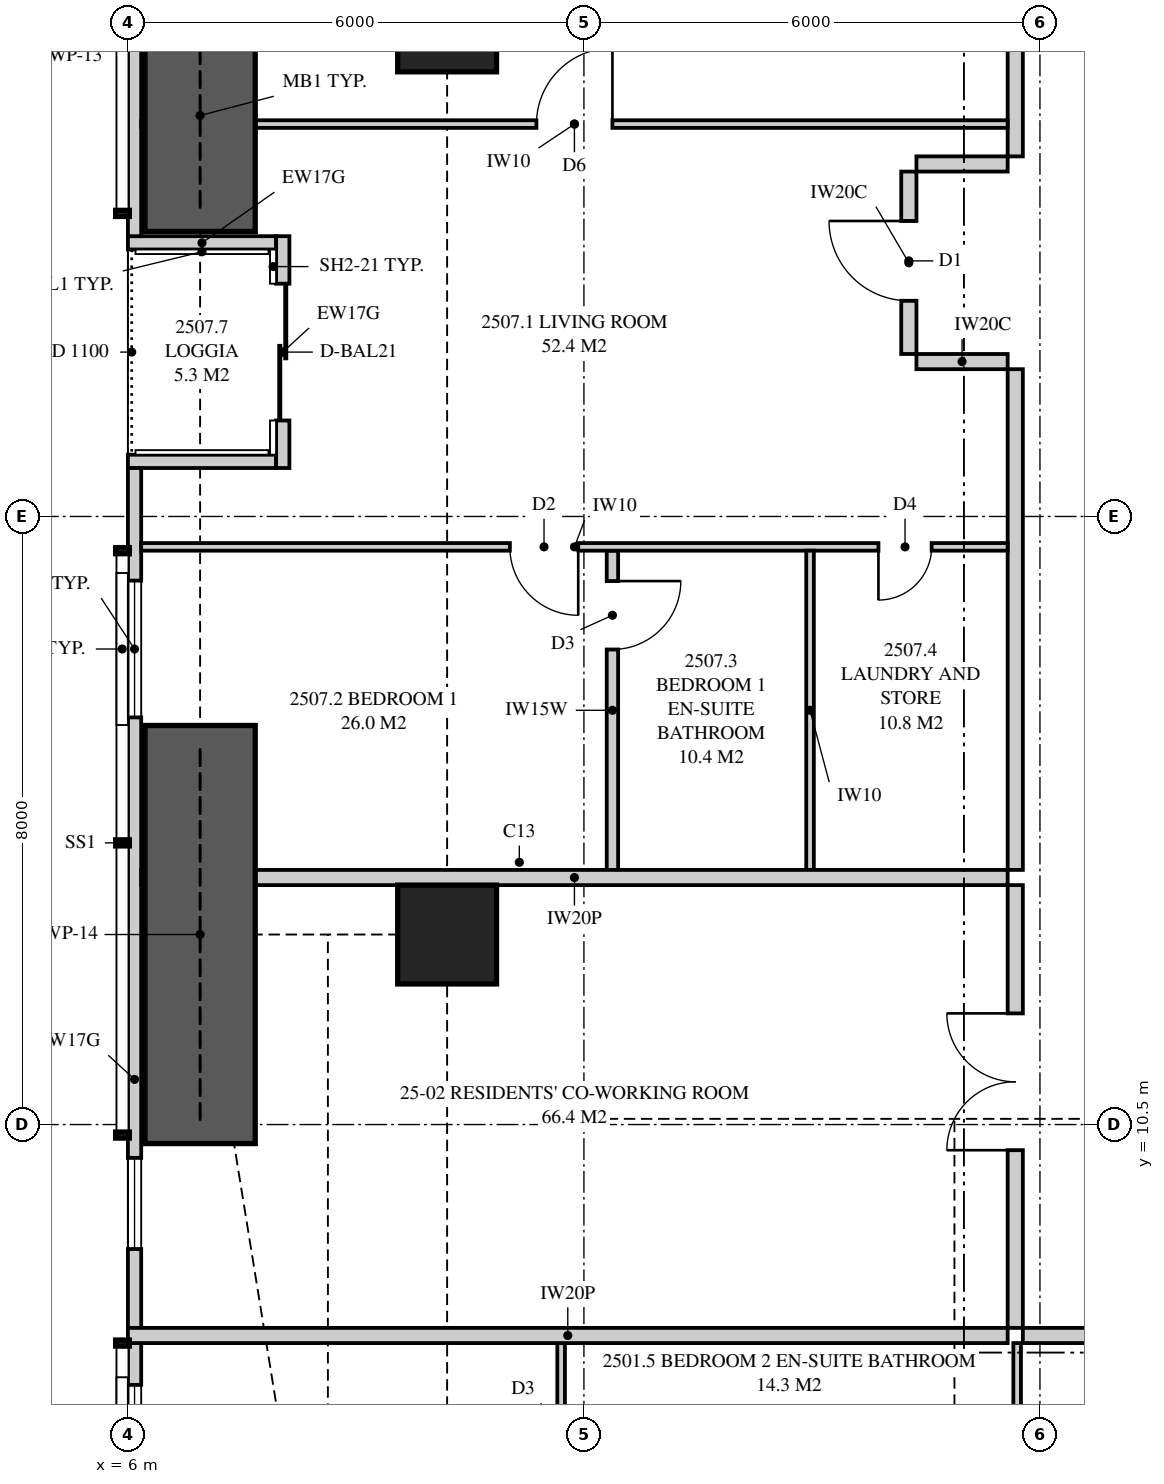
"""IFC4 building model, lengths in metres.
Left out: names, types, materials, properties, quantities, classifications, styles, units other than length and angle.
Written with IfcOpenShell. Run it as: python <this file> out.ifc"""

import sys

from ifc_helpers import new_model, si_unit, direction, frame, frame_2d, origin, origin_2d, place, context, subcontext, project, spatial, polyline, rectangle, outline, extrude, element, fill, save


model = new_model("IFC4")
c1 = context("Model", 3, precision=1e-05, world=origin(), true_north=direction((0.0, 1.0)))
c2 = subcontext(c1, "Body", "Model", "MODEL_VIEW")
j1 = project(units=[si_unit("LENGTHUNIT", "METRE"), si_unit("PLANEANGLEUNIT", "RADIAN")], contexts=[c1])
p1 = place(None, origin())
s1 = spatial("IfcSite", under=j1, at=p1, CompositionType="ELEMENT")
p2 = place(p1, origin())
s2 = spatial("IfcBuilding", under=s1, at=p2, CompositionType="ELEMENT")
p3 = place(p2, frame((0.0, 0.0, 94.8)))
s3 = spatial("IfcBuildingStorey", under=s2, at=p3, CompositionType="ELEMENT", Elevation=94.8)
for number, where, z_axis, x_axis in (
    (1, (10.2, 13.0, 0.0), (0.0, 0.0, 1.0), (1.0, 0.0, 0.0)),
    (2, (10.2, 25.0, 0.0), (0.0, 0.0, 1.0), (1.0, 0.0, 0.0)),
):
    element("IfcColumn", number, at=place(p3, frame(where, z_axis=z_axis, x_axis=x_axis)), inside=s3, PredefinedType="COLUMN", context=c2, shape_type="SweptSolid", body=[
        extrude(rectangle(XDim=1.3, YDim=1.3, at=origin_2d()), origin(), (0.0, 0.0, 1.0), 3.35),
    ])
p4 = place(p3, frame((6.087, 34.949, 0.0), z_axis=(0.0, 0.0, 1.0), x_axis=(0.0, -1.0, 0.0)))
e3 = element("IfcWall", 3, at=p4, inside=s3, PredefinedType="SOLIDWALL", context=c2, shape_type="SweptSolid", body=[
    extrude(outline(polyline([(0.0, 0.0), (12.761, 0.0), (12.761, 2.15), (9.949, 2.15), (9.949, 3.11), (9.823, 3.11), (9.823, 2.15), (9.73, 2.15), (9.73, 3.11), (0.0, 3.11), (0.0, 0.0)])), frame((0.0, 0.087, 0.0), z_axis=(0.0, -1.0, 0.0), x_axis=(1.0, 0.0, 0.0)), (0.0, 0.0, 1.0), 0.175),
])
p5 = place(p4, frame((2.724, 0.0, 0.4)))
e4 = element("IfcOpeningElement", 4, at=p5, cuts=e3, PredefinedType="OPENING", context=c2, shape_type="SweptSolid", body=[
    extrude(rectangle(XDim=1.8, YDim=1.7, at=frame_2d((0.9, 0.85))), frame((0.0, 0.097, 0.0), z_axis=(0.0, -1.0, 0.0), x_axis=(1.0, 0.0, 0.0)), (0.0, 0.0, 1.0), 0.195),
])
p6 = place(p4, frame((5.874, 0.0, 0.4)))
e5 = element("IfcOpeningElement", 5, at=p6, cuts=e3, PredefinedType="OPENING", context=c2, shape_type="SweptSolid", body=[
    extrude(rectangle(XDim=1.2, YDim=1.7, at=frame_2d((0.6, 0.85))), frame((0.0, 0.097, 0.0), z_axis=(0.0, -1.0, 0.0), x_axis=(1.0, 0.0, 0.0)), (0.0, 0.0, 1.0), 0.195),
])
p7 = place(p3, frame((6.087, 19.137, 0.0), z_axis=(0.0, 0.0, 1.0), x_axis=(0.0, -1.0, 0.0)))
e6 = element("IfcWall", 6, at=p7, inside=s3, PredefinedType="SOLIDWALL", context=c2, shape_type="SweptSolid", body=[
    extrude(outline(polyline([(0.0, 0.0), (16.086, 0.0), (16.086, 3.11), (6.356, 3.11), (6.356, 2.15), (6.263, 2.15), (6.263, 3.11), (6.137, 3.11), (6.137, 2.15), (0.0, 2.15), (0.0, 0.0)])), frame((0.0, 0.087, 0.0), z_axis=(0.0, -1.0, 0.0), x_axis=(1.0, 0.0, 0.0)), (0.0, 0.0, 1.0), 0.175),
])
p8 = place(p7, frame((1.481, 0.0, 0.4)))
e7 = element("IfcOpeningElement", 7, at=p8, cuts=e6, PredefinedType="OPENING", context=c2, shape_type="SweptSolid", body=[
    extrude(rectangle(XDim=1.8, YDim=1.7, at=frame_2d((0.9, 0.85))), frame((0.0, 0.097, 0.0), z_axis=(0.0, -1.0, 0.0), x_axis=(1.0, 0.0, 0.0)), (0.0, 0.0, 1.0), 0.195),
])
p9 = place(p7, frame((9.076, 0.0, 0.4)))
e8 = element("IfcOpeningElement", 8, at=p9, cuts=e6, PredefinedType="OPENING", context=c2, shape_type="SweptSolid", body=[
    extrude(rectangle(XDim=1.2, YDim=1.7, at=frame_2d((0.6, 0.85))), frame((0.0, 0.097, 0.0), z_axis=(0.0, -1.0, 0.0), x_axis=(1.0, 0.0, 0.0)), (0.0, 0.0, 1.0), 0.195),
])
p10 = place(p7, frame((12.062, 0.0, 0.4)))
e9 = element("IfcOpeningElement", 9, at=p10, cuts=e6, PredefinedType="OPENING", context=c2, shape_type="SweptSolid", body=[
    extrude(rectangle(XDim=1.8, YDim=1.7, at=frame_2d((0.9, 0.85))), frame((0.0, 0.097, 0.0), z_axis=(0.0, -1.0, 0.0), x_axis=(1.0, 0.0, 0.0)), (0.0, 0.0, 1.0), 0.195),
])
p11 = place(p3, frame((8.038, 22.188, 0.0), z_axis=(0.0, 0.0, 1.0), x_axis=(0.0, -1.0, 0.0)))
e10 = element("IfcWall", 10, at=p11, inside=s3, PredefinedType="SOLIDWALL", context=c2, shape_type="SweptSolid", body=[
    extrude(rectangle(XDim=3.05, YDim=0.175, at=frame_2d((1.525, 0.0))), origin(), (0.0, 0.0, 1.0), 3.11),
])
p12 = place(p11, frame((0.625, 0.0, 0.0)))
e11 = element("IfcOpeningElement", 11, at=p12, cuts=e10, PredefinedType="OPENING", context=c2, shape_type="SweptSolid", body=[
    extrude(rectangle(XDim=1.8, YDim=2.1, at=frame_2d((0.9, 1.05))), frame((0.0, 0.097, 0.0), z_axis=(0.0, -1.0, 0.0), x_axis=(1.0, 0.0, 0.0)), (0.0, 0.0, 1.0), 0.195),
])
for number, where, z_axis, x_axis in (
    (12, (6.0, 22.1, 0.0), (0.0, 0.0, 1.0), (1.0, 0.0, 0.0)),
    (13, (6.0, 19.225, 0.0), (0.0, 0.0, 1.0), (1.0, 0.0, 0.0)),
):
    element("IfcWall", number, at=place(p3, frame(where, z_axis=z_axis, x_axis=x_axis)), inside=s3, PredefinedType="SOLIDWALL", context=c2, shape_type="SweptSolid", body=[
        extrude(outline(polyline([(0.0, 0.0), (1.95, 0.0), (1.95, 3.11), (1.75, 3.11), (1.75, 2.15), (0.15, 2.15), (0.15, 3.11), (0.0, 3.11), (0.0, 0.0)])), frame((0.0, 0.087, 0.0), z_axis=(0.0, -1.0, 0.0), x_axis=(1.0, 0.0, 0.0)), (0.0, 0.0, 1.0), 0.175),
    ])
p13 = place(p3, frame((17.775, 7.725, 0.0), z_axis=(0.0, 0.0, 1.0), x_axis=(1.0, 0.0, 0.0)))
e14 = element("IfcWall", 14, at=p13, inside=s3, PredefinedType="PARTITIONING", context=c2, shape_type="SweptSolid", body=[
    extrude(rectangle(XDim=4.325, YDim=0.2, at=frame_2d((2.163, 0.0))), origin(), (0.0, 0.0, 1.0), 3.11),
])
p14 = place(p3, frame((11.7, 0.175, 0.0), z_axis=(0.0, 0.0, 1.0), x_axis=(0.0, 1.0, 0.0)))
e15 = element("IfcWall", 15, at=p14, inside=s3, PredefinedType="PARTITIONING", context=c2, shape_type="SweptSolid", body=[
    extrude(outline(polyline([(0.0, 0.0), (7.45, 0.0), (7.45, 3.11), (2.708, 3.11), (2.708, 2.15), (0.953, 2.15), (0.953, 3.11), (0.0, 3.11), (0.0, 0.0)])), frame((0.0, 0.05, 0.0), z_axis=(0.0, -1.0, 0.0), x_axis=(1.0, 0.0, 0.0)), (0.0, 0.0, 1.0), 0.1),
])
p15 = place(p14, frame((2.701, 0.0, 0.0)))
e16 = element("IfcOpeningElement", 16, at=p15, cuts=e15, PredefinedType="OPENING", context=c2, shape_type="SweptSolid", body=[
    extrude(rectangle(XDim=0.9, YDim=2.1, at=frame_2d((0.45, 1.05))), frame((0.0, 0.06, 0.0), z_axis=(0.0, -1.0, 0.0), x_axis=(1.0, 0.0, 0.0)), (0.0, 0.0, 1.0), 0.12),
])
p16 = place(p14, frame((5.525, 0.0, 0.0)))
e17 = element("IfcOpeningElement", 17, at=p16, cuts=e15, PredefinedType="OPENING", context=c2, shape_type="SweptSolid", body=[
    extrude(rectangle(XDim=0.9, YDim=2.1, at=frame_2d((0.45, 1.05))), frame((0.0, 0.06, 0.0), z_axis=(0.0, -1.0, 0.0), x_axis=(1.0, 0.0, 0.0)), (0.0, 0.0, 1.0), 0.12),
])
p17 = place(p3, frame((17.7, 0.175, 0.0), z_axis=(0.0, 0.0, 1.0), x_axis=(0.0, 1.0, 0.0)))
e18 = element("IfcWall", 18, at=p17, inside=s3, PredefinedType="PARTITIONING", context=c2, shape_type="SweptSolid", body=[
    extrude(outline(polyline([(1.635, 2.15), (0.0, 2.15), (0.0, 0.0), (7.45, 0.0), (7.45, 3.11), (1.635, 3.11), (1.635, 2.15)]), holes=[polyline([(1.021, 0.116), (0.529, 0.116), (0.529, 0.906), (1.021, 0.906), (1.021, 0.116)]), polyline([(1.021, 1.244), (0.529, 1.244), (0.529, 2.034), (1.021, 2.034), (1.021, 1.244)])]), frame((0.0, 0.05, 0.0), z_axis=(0.0, -1.0, 0.0), x_axis=(1.0, 0.0, 0.0)), (0.0, 0.0, 1.0), 0.1),
])
p18 = place(p17, frame((3.6, 0.0, 0.0)))
e19 = element("IfcOpeningElement", 19, at=p18, cuts=e18, PredefinedType="OPENING", context=c2, shape_type="SweptSolid", body=[
    extrude(rectangle(XDim=0.9, YDim=2.1, at=frame_2d((0.45, 1.05))), frame((0.0, 0.06, 0.0), z_axis=(0.0, -1.0, 0.0), x_axis=(1.0, 0.0, 0.0)), (0.0, 0.0, 1.0), 0.12),
])
p19 = place(p3, frame((6.0, 7.725, 0.0), z_axis=(0.0, 0.0, 1.0), x_axis=(1.0, 0.0, 0.0)))
e20 = element("IfcWall", 20, at=p19, inside=s3, PredefinedType="PARTITIONING", context=c2, shape_type="SweptSolid", body=[
    extrude(outline(polyline([(0.0, 0.0), (11.575, 0.0), (11.575, 3.11), (11.212, 3.11), (11.212, 2.541), (10.538, 2.541), (10.538, 3.11), (5.51, 3.11), (5.51, 2.51), (2.969, 2.51), (2.969, 2.541), (2.727, 2.541), (2.727, 2.15), (0.884, 2.15), (0.884, 3.11), (0.0, 3.11), (0.0, 0.0)])), frame((0.0, 0.1, 0.0), z_axis=(0.0, -1.0, 0.0), x_axis=(1.0, 0.0, 0.0)), (0.0, 0.0, 1.0), 0.2),
])
p20 = place(p3, frame((6.175, 13.75, 0.0), z_axis=(0.0, 0.0, 1.0), x_axis=(1.0, 0.0, 0.0)))
e21 = element("IfcWall", 21, at=p20, inside=s3, PredefinedType="PARTITIONING", context=c2, shape_type="SweptSolid", body=[
    extrude(outline(polyline([(1.685, 2.15), (0.0, 2.15), (0.0, 0.0), (11.4, 0.0), (11.4, 3.11), (5.335, 3.11), (5.335, 2.51), (2.715, 2.51), (2.715, 3.11), (1.685, 3.11), (1.685, 2.15)]), holes=[polyline([(1.021, 0.133), (0.529, 0.133), (0.529, 0.991), (1.021, 0.991), (1.021, 0.133)]), polyline([(1.021, 1.158), (0.529, 1.158), (0.529, 2.017), (1.021, 2.017), (1.021, 1.158)])]), frame((0.0, 0.1, 0.0), z_axis=(0.0, -1.0, 0.0), x_axis=(1.0, 0.0, 0.0)), (0.0, 0.0, 1.0), 0.2),
])
p21 = place(p3, frame((17.675, 7.825, 0.0), z_axis=(0.0, 0.0, 1.0), x_axis=(0.0, 1.0, 0.0)))
e22 = element("IfcWall", 22, at=p21, inside=s3, PredefinedType="PARTITIONING", context=c2, shape_type="SweptSolid", body=[
    extrude(outline(polyline([(0.0, 0.0), (5.825, 0.0), (5.825, 3.11), (3.087, 3.11), (3.087, 2.541), (2.413, 2.541), (2.413, 3.11), (0.0, 3.11), (0.0, 0.0)])), frame((0.0, 0.1, 0.0), z_axis=(0.0, -1.0, 0.0), x_axis=(1.0, 0.0, 0.0)), (0.0, 0.0, 1.0), 0.2),
])
p22 = place(p21, frame((2.337, 0.0, 0.0)))
e23 = element("IfcOpeningElement", 23, at=p22, cuts=e22, PredefinedType="OPENING", context=c2, shape_type="SweptSolid", body=[
    extrude(rectangle(XDim=1.8, YDim=2.1, at=frame_2d((0.9, 1.05))), frame((0.0, 0.11, 0.0), z_axis=(0.0, -1.0, 0.0), x_axis=(1.0, 0.0, 0.0)), (0.0, 0.0, 1.0), 0.22),
])
p23 = place(p3, frame((17.675, 13.85, 0.0), z_axis=(0.0, 0.0, 1.0), x_axis=(0.0, 1.0, 0.0)))
e24 = element("IfcWall", 24, at=p23, inside=s3, PredefinedType="PARTITIONING", context=c2, shape_type="SweptSolid", body=[
    extrude(rectangle(XDim=6.587, YDim=0.2, at=frame_2d((3.294, 0.0))), origin(), (0.0, 0.0, 1.0), 3.11),
])
p24 = place(p3, frame((6.175, 18.1, 0.0), z_axis=(0.0, 0.0, 1.0), x_axis=(1.0, 0.0, 0.0)))
e25 = element("IfcWall", 25, at=p24, inside=s3, PredefinedType="PARTITIONING", context=c2, shape_type="SweptSolid", body=[
    extrude(outline(polyline([(0.0, 0.0), (11.4, 0.0), (11.4, 3.11), (5.285, 3.11), (5.285, 2.51), (2.765, 2.51), (2.765, 3.11), (1.635, 3.11), (1.635, 2.15), (0.0, 2.15), (0.0, 3.11), (0.0, 0.0)])), frame((0.0, 0.05, 0.0), z_axis=(0.0, -1.0, 0.0), x_axis=(1.0, 0.0, 0.0)), (0.0, 0.0, 1.0), 0.1),
])
p25 = place(p24, frame((4.85, 0.0, 0.0)))
e26 = element("IfcOpeningElement", 26, at=p25, cuts=e25, PredefinedType="OPENING", context=c2, shape_type="SweptSolid", body=[
    extrude(rectangle(XDim=0.9, YDim=2.1, at=frame_2d((0.45, 1.05))), frame((0.0, 0.06, 0.0), z_axis=(0.0, -1.0, 0.0), x_axis=(1.0, 0.0, 0.0)), (0.0, 0.0, 1.0), 0.12),
])
p26 = place(p24, frame((9.7, 0.0, 0.0)))
e27 = element("IfcOpeningElement", 27, at=p26, cuts=e25, PredefinedType="OPENING", context=c2, shape_type="SweptSolid", body=[
    extrude(rectangle(XDim=0.7, YDim=2.1, at=frame_2d((0.35, 1.05))), frame((0.0, 0.06, 0.0), z_axis=(0.0, -1.0, 0.0), x_axis=(1.0, 0.0, 0.0)), (0.0, 0.0, 1.0), 0.12),
])
p27 = place(p3, frame((12.375, 13.85, 0.0), z_axis=(0.0, 0.0, 1.0), x_axis=(0.0, 1.0, 0.0)))
e28 = element("IfcWall", 28, at=p27, inside=s3, PredefinedType="PLUMBINGWALL", context=c2, shape_type="SweptSolid", body=[
    extrude(rectangle(XDim=4.2, YDim=0.15, at=frame_2d((2.1, 0.0))), origin(), (0.0, 0.0, 1.0), 3.11),
])
p28 = place(p27, frame((2.9, 0.0, 0.0)))
e29 = element("IfcOpeningElement", 29, at=p28, cuts=e28, PredefinedType="OPENING", context=c2, shape_type="SweptSolid", body=[
    extrude(rectangle(XDim=0.9, YDim=2.1, at=frame_2d((0.45, 1.05))), frame((0.0, 0.085, 0.0), z_axis=(0.0, -1.0, 0.0), x_axis=(1.0, 0.0, 0.0)), (0.0, 0.0, 1.0), 0.17),
])
p29 = place(p3, frame((14.975, 13.85, 0.0), z_axis=(0.0, 0.0, 1.0), x_axis=(0.0, 1.0, 0.0)))
e30 = element("IfcWall", 30, at=p29, inside=s3, PredefinedType="PARTITIONING", context=c2, shape_type="SweptSolid", body=[
    extrude(rectangle(XDim=4.2, YDim=0.1, at=frame_2d((2.1, 0.0))), origin(), (0.0, 0.0, 1.0), 3.11),
])
p30 = place(p3, frame((6.175, 23.663, 0.0), z_axis=(0.0, 0.0, 1.0), x_axis=(1.0, 0.0, 0.0)))
e31 = element("IfcWall", 31, at=p30, inside=s3, PredefinedType="PARTITIONING", context=c2, shape_type="SweptSolid", body=[
    extrude(outline(polyline([(0.529, 2.15), (0.0, 2.15), (0.0, 0.0), (0.529, 0.0), (0.529, 0.555), (1.021, 0.555), (1.021, 0.0), (11.4, 0.0), (11.4, 3.11), (5.285, 3.11), (5.285, 2.51), (2.765, 2.51), (2.765, 3.11), (1.635, 3.11), (1.635, 2.15), (1.021, 2.15), (1.021, 1.594), (0.529, 1.594), (0.529, 2.15)])), frame((0.0, 0.05, 0.0), z_axis=(0.0, -1.0, 0.0), x_axis=(1.0, 0.0, 0.0)), (0.0, 0.0, 1.0), 0.1),
])
p31 = place(p30, frame((5.2, 0.0, 0.0)))
e32 = element("IfcOpeningElement", 32, at=p31, cuts=e31, PredefinedType="OPENING", context=c2, shape_type="SweptSolid", body=[
    extrude(rectangle(XDim=1.0, YDim=2.1, at=frame_2d((0.5, 1.05))), frame((0.0, 0.06, 0.0), z_axis=(0.0, -1.0, 0.0), x_axis=(1.0, 0.0, 0.0)), (0.0, 0.0, 1.0), 0.12),
])
p32 = place(p3, frame((17.675, 23.238, 0.0), z_axis=(0.0, 0.0, 1.0), x_axis=(0.0, 1.0, 0.0)))
e33 = element("IfcWall", 33, at=p32, inside=s3, PredefinedType="PARTITIONING", context=c2, shape_type="SweptSolid", body=[
    extrude(outline(polyline([(0.0, 0.0), (5.938, 0.0), (5.938, 3.11), (3.525, 3.11), (3.525, 2.541), (2.85, 2.541), (2.85, 3.11), (0.0, 3.11), (0.0, 0.0)])), frame((0.0, 0.1, 0.0), z_axis=(0.0, -1.0, 0.0), x_axis=(1.0, 0.0, 0.0)), (0.0, 0.0, 1.0), 0.2),
])
p33 = place(p3, frame((16.275, 20.637, 0.0), z_axis=(0.0, 0.0, 1.0), x_axis=(0.0, 1.0, 0.0)))
e34 = element("IfcWall", 34, at=p33, inside=s3, PredefinedType="PARTITIONING", context=c2, shape_type="SweptSolid", body=[
    extrude(rectangle(XDim=2.4, YDim=0.2, at=frame_2d((1.2, 0.0))), origin(), (0.0, 0.0, 1.0), 3.11),
])
p34 = place(p33, frame((0.7, 0.0, 0.0)))
e35 = element("IfcOpeningElement", 35, at=p34, cuts=e34, PredefinedType="OPENING", context=c2, shape_type="SweptSolid", body=[
    extrude(rectangle(XDim=1.05, YDim=2.2, at=frame_2d((0.525, 1.1))), frame((0.0, 0.11, 0.0), z_axis=(0.0, -1.0, 0.0), x_axis=(1.0, 0.0, 0.0)), (0.0, 0.0, 1.0), 0.22),
])
for number, where, z_axis, x_axis in (
    (36, (17.575, 20.538, 0.0), (0.0, 0.0, 1.0), (-1.0, 0.0, 0.0)),
    (37, (17.575, 23.137, 0.0), (0.0, 0.0, 1.0), (-1.0, 0.0, 0.0)),
):
    element("IfcWall", number, at=place(p3, frame(where, z_axis=z_axis, x_axis=x_axis)), inside=s3, PredefinedType="PARTITIONING", context=c2, shape_type="SweptSolid", body=[
        extrude(rectangle(XDim=1.2, YDim=0.2, at=frame_2d((0.6, 0.0))), origin(), (0.0, 0.0, 1.0), 3.11),
    ])
for number, where, z_axis, x_axis in (
    (38, (6.95, 22.25, 0.0), (0.0, 0.0, 1.0), (0.0, 1.0, 0.0)),
    (39, (6.95, 10.25, 0.0), (0.0, 0.0, 1.0), (0.0, 1.0, 0.0)),
):
    element("IfcWall", number, at=place(p3, frame(where, z_axis=z_axis, x_axis=x_axis)), inside=s3, PredefinedType="SHEAR", context=c2, shape_type="SweptSolid", body=[
        extrude(rectangle(XDim=5.5, YDim=1.45, at=frame_2d((2.75, 0.0))), origin(), (0.0, 0.0, 1.0), 3.35),
    ])
p35 = place(p12, origin())
e40 = element("IfcDoor", 40, at=p35, inside=s3, OperationType="SLIDING_TO_LEFT", PredefinedType="DOOR", context=c2, shape_type="SweptSolid", body=[
    extrude(rectangle(XDim=1.8, YDim=2.1, at=frame_2d((0.9, 1.05))), frame((0.0, 0.025, 0.0), z_axis=(0.0, -1.0, 0.0), x_axis=(1.0, 0.0, 0.0)), (0.0, 0.0, 1.0), 0.05),
])
fill(e11, e40)
p36 = place(p8, origin())
e41 = element("IfcWindow", 41, at=p36, inside=s3, PartitioningType="SINGLE_PANEL", PredefinedType="WINDOW", context=c2, shape_type="SweptSolid", body=[
    extrude(rectangle(XDim=1.8, YDim=1.7, at=frame_2d((0.9, 0.85))), frame((0.0, 0.03, 0.0), z_axis=(0.0, -1.0, 0.0), x_axis=(1.0, 0.0, 0.0)), (0.0, 0.0, 1.0), 0.06),
])
fill(e7, e41)
p37 = place(p9, origin())
e42 = element("IfcWindow", 42, at=p37, inside=s3, PartitioningType="SINGLE_PANEL", PredefinedType="WINDOW", context=c2, shape_type="SweptSolid", body=[
    extrude(rectangle(XDim=1.2, YDim=1.7, at=frame_2d((0.6, 0.85))), frame((0.0, 0.03, 0.0), z_axis=(0.0, -1.0, 0.0), x_axis=(1.0, 0.0, 0.0)), (0.0, 0.0, 1.0), 0.06),
])
fill(e8, e42)
p38 = place(p10, origin())
e43 = element("IfcWindow", 43, at=p38, inside=s3, PartitioningType="SINGLE_PANEL", PredefinedType="WINDOW", context=c2, shape_type="SweptSolid", body=[
    extrude(rectangle(XDim=1.8, YDim=1.7, at=frame_2d((0.9, 0.85))), frame((0.0, 0.03, 0.0), z_axis=(0.0, -1.0, 0.0), x_axis=(1.0, 0.0, 0.0)), (0.0, 0.0, 1.0), 0.06),
])
fill(e9, e43)
p39 = place(p22, origin())
e44 = element("IfcDoor", 44, at=p39, inside=s3, OperationType="DOUBLE_DOOR_SINGLE_SWING", PredefinedType="DOOR", context=c2, shape_type="SweptSolid", body=[
    extrude(rectangle(XDim=1.8, YDim=2.1, at=frame_2d((0.9, 1.05))), frame((0.0, 0.025, 0.0), z_axis=(0.0, -1.0, 0.0), x_axis=(1.0, 0.0, 0.0)), (0.0, 0.0, 1.0), 0.05),
])
fill(e23, e44)
p40 = place(p34, origin())
e45 = element("IfcDoor", 45, at=p40, inside=s3, OperationType="SINGLE_SWING_RIGHT", PredefinedType="DOOR", context=c2, shape_type="SweptSolid", body=[
    extrude(rectangle(XDim=1.05, YDim=2.2, at=frame_2d((0.525, 1.1))), frame((0.0, 0.025, 0.0), z_axis=(0.0, -1.0, 0.0), x_axis=(1.0, 0.0, 0.0)), (0.0, 0.0, 1.0), 0.05),
])
fill(e35, e45)
p41 = place(p25, frame((0.9, 0.0, 0.0), z_axis=(0.0, 0.0, 1.0), x_axis=(-1.0, 0.0, 0.0)))
e46 = element("IfcDoor", 46, at=p41, inside=s3, OperationType="SINGLE_SWING_LEFT", PredefinedType="DOOR", context=c2, shape_type="SweptSolid", body=[
    extrude(rectangle(XDim=0.9, YDim=2.1, at=frame_2d((0.45, 1.05))), frame((0.0, 0.025, 0.0), z_axis=(0.0, -1.0, 0.0), x_axis=(1.0, 0.0, 0.0)), (0.0, 0.0, 1.0), 0.05),
])
fill(e26, e46)
p42 = place(p28, frame((0.9, 0.0, 0.0), z_axis=(0.0, 0.0, 1.0), x_axis=(-1.0, 0.0, 0.0)))
e47 = element("IfcDoor", 47, at=p42, inside=s3, OperationType="SINGLE_SWING_LEFT", PredefinedType="DOOR", context=c2, shape_type="SweptSolid", body=[
    extrude(rectangle(XDim=0.9, YDim=2.1, at=frame_2d((0.45, 1.05))), frame((0.0, 0.025, 0.0), z_axis=(0.0, -1.0, 0.0), x_axis=(1.0, 0.0, 0.0)), (0.0, 0.0, 1.0), 0.05),
])
fill(e29, e47)
p43 = place(p26, frame((0.7, 0.0, 0.0), z_axis=(0.0, 0.0, 1.0), x_axis=(-1.0, 0.0, 0.0)))
e48 = element("IfcDoor", 48, at=p43, inside=s3, OperationType="SINGLE_SWING_RIGHT", PredefinedType="DOOR", context=c2, shape_type="SweptSolid", body=[
    extrude(rectangle(XDim=0.7, YDim=2.1, at=frame_2d((0.35, 1.05))), frame((0.0, 0.025, 0.0), z_axis=(0.0, -1.0, 0.0), x_axis=(1.0, 0.0, 0.0)), (0.0, 0.0, 1.0), 0.05),
])
fill(e27, e48)
p44 = place(p31, origin())
e49 = element("IfcDoor", 49, at=p44, inside=s3, OperationType="SINGLE_SWING_RIGHT", PredefinedType="DOOR", context=c2, shape_type="SweptSolid", body=[
    extrude(rectangle(XDim=1.0, YDim=2.1, at=frame_2d((0.5, 1.05))), frame((0.0, 0.025, 0.0), z_axis=(0.0, -1.0, 0.0), x_axis=(1.0, 0.0, 0.0)), (0.0, 0.0, 1.0), 0.05),
])
fill(e32, e49)
save(model, sys.argv[1])
